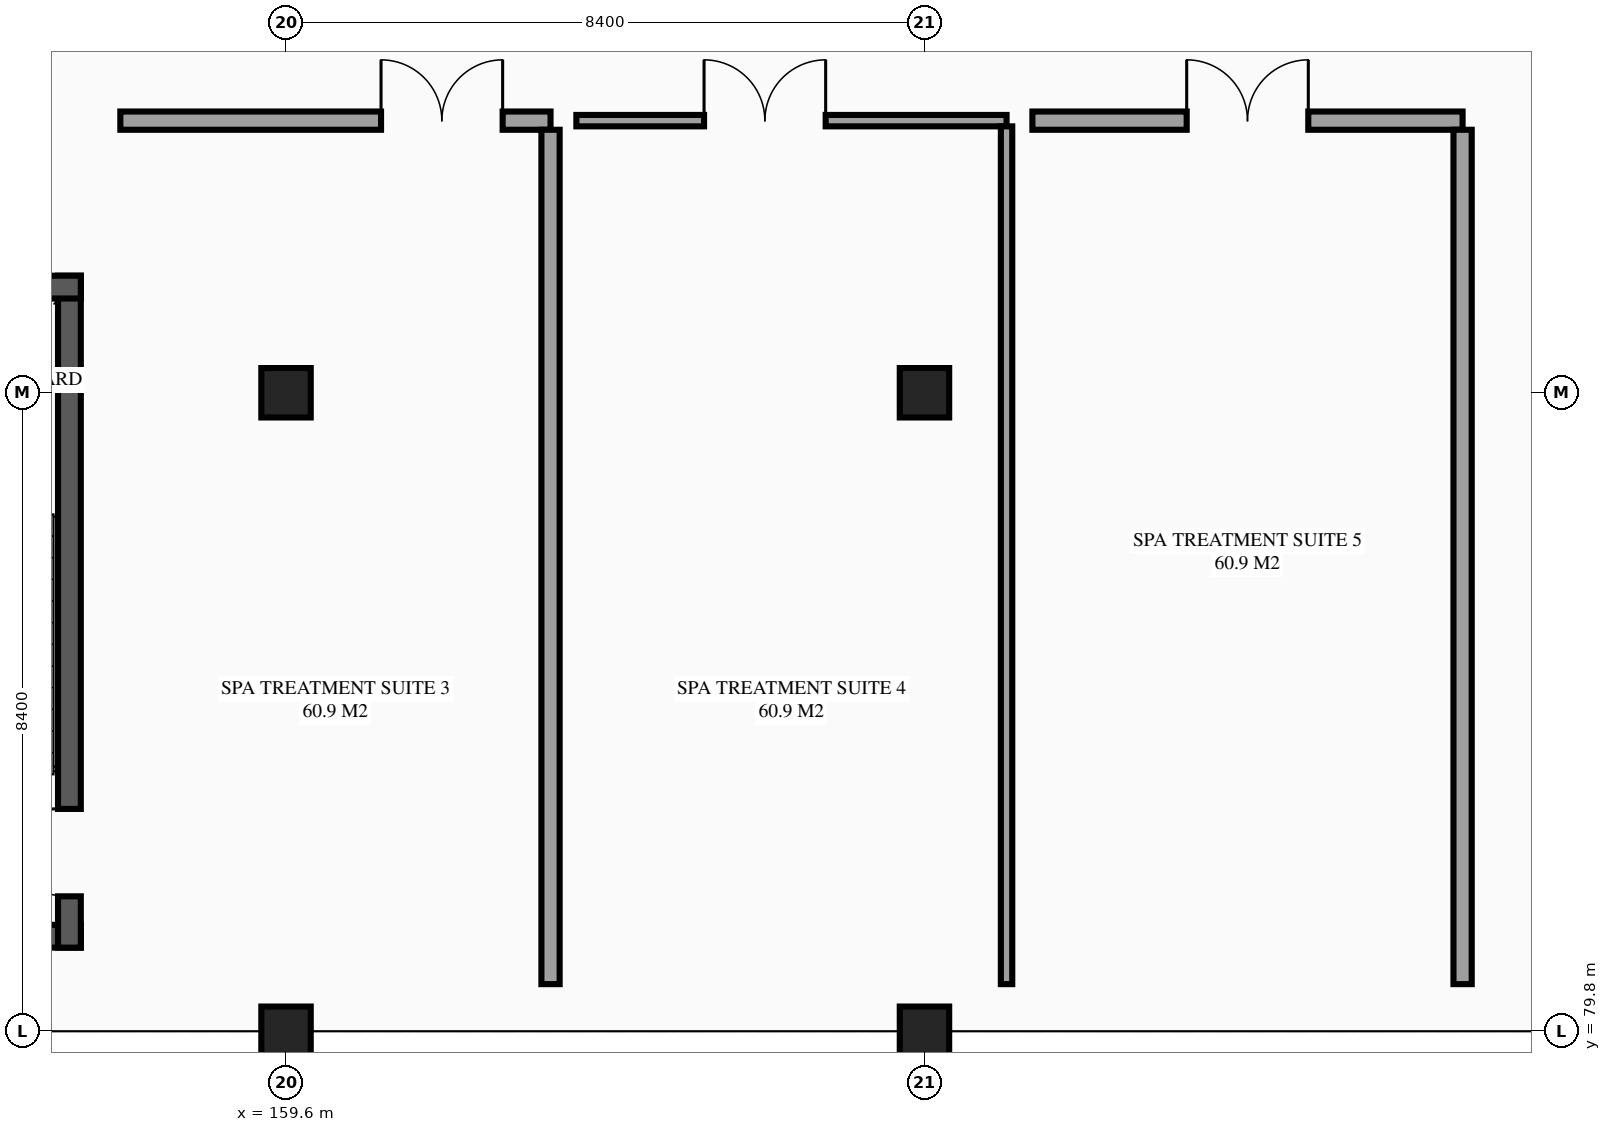
"""IFC4 building model, lengths in metres.
Left out: names, types, materials, properties, quantities, classifications, styles, units other than length and angle.
Written with IfcOpenShell. Run it as: python <this file> out.ifc"""

import sys

from ifc_helpers import new_model, si_unit, direction, frame, frame_2d, origin, origin_2d, place, context, subcontext, project, spatial, rectangle, extrude, element, fill, save


model = new_model("IFC4")
c1 = context("Model", 3, precision=1e-05, world=origin(), true_north=direction((0.0, 1.0)))
c2 = subcontext(c1, "Body", "Model", "MODEL_VIEW")
j1 = project(units=[si_unit("LENGTHUNIT", "METRE"), si_unit("PLANEANGLEUNIT", "RADIAN")], contexts=[c1])
p1 = place(None, origin())
s1 = spatial("IfcSite", under=j1, at=p1, CompositionType="ELEMENT")
p2 = place(p1, origin())
s2 = spatial("IfcBuilding", under=s1, at=p2, CompositionType="ELEMENT")
p3 = place(p2, frame((0.0, 0.0, 5.4)))
s3 = spatial("IfcBuildingStorey", under=s2, at=p3, CompositionType="ELEMENT", Elevation=5.4)
for number, where, z_axis, x_axis in (
    (1, (159.6, 79.8, 0.0), (0.0, 0.0, 1.0), (1.0, 0.0, 0.0)),
    (2, (159.6, 88.2, 0.0), (0.0, 0.0, 1.0), (1.0, 0.0, 0.0)),
    (3, (168.0, 79.8, 0.0), (0.0, 0.0, 1.0), (1.0, 0.0, 0.0)),
    (4, (168.0, 88.2, 0.0), (0.0, 0.0, 1.0), (1.0, 0.0, 0.0)),
):
    element("IfcColumn", number, at=place(p3, frame(where, z_axis=z_axis, x_axis=x_axis)), inside=s3, PredefinedType="COLUMN", context=c2, shape_type="SweptSolid", body=[
        extrude(rectangle(XDim=0.65, YDim=0.65, at=origin_2d()), origin(), (0.0, 0.0, 1.0), 4.5),
    ])
p4 = place(p3, frame((151.7, 81.05, 0.0), z_axis=(0.0, 0.0, 1.0), x_axis=(1.0, 0.0, 0.0)))
e5 = element("IfcWall", 5, at=p4, inside=s3, PredefinedType="SHEAR", context=c2, shape_type="SweptSolid", body=[
    extrude(rectangle(XDim=5.2, YDim=0.3, at=frame_2d((2.6, 0.0))), origin(), (0.0, 0.0, 1.0), 4.5),
])
p5 = place(p3, frame((156.75, 80.9, 0.0), z_axis=(0.0, 0.0, 1.0), x_axis=(0.0, 1.0, 0.0)))
e6 = element("IfcWall", 6, at=p5, inside=s3, PredefinedType="SHEAR", context=c2, shape_type="SweptSolid", body=[
    extrude(rectangle(XDim=8.84, YDim=0.3, at=frame_2d((4.42, 0.0))), origin(), (0.0, 0.0, 1.0), 4.5),
])
p6 = place(p5, frame((0.675, 0.0, 0.0)))
e7 = element("IfcOpeningElement", 7, at=p6, cuts=e6, PredefinedType="OPENING", context=c2, shape_type="SweptSolid", body=[
    extrude(rectangle(XDim=1.15, YDim=2.15, at=frame_2d((0.575, 1.075))), frame((0.0, 0.16, 0.0), z_axis=(0.0, -1.0, 0.0), x_axis=(1.0, 0.0, 0.0)), (0.0, 0.0, 1.0), 0.32),
])
p7 = place(p3, frame((156.9, 89.59, 0.0), z_axis=(0.0, 0.0, 1.0), x_axis=(-1.0, 0.0, 0.0)))
e8 = element("IfcWall", 8, at=p7, inside=s3, PredefinedType="SHEAR", context=c2, shape_type="SweptSolid", body=[
    extrude(rectangle(XDim=5.2, YDim=0.3, at=frame_2d((2.6, 0.0))), origin(), (0.0, 0.0, 1.0), 4.5),
])
p8 = place(p3, frame((157.42, 91.78, 0.0), z_axis=(0.0, 0.0, 1.0), x_axis=(1.0, 0.0, 0.0)))
e9 = element("IfcWall", 9, at=p8, inside=s3, PredefinedType="PARTITIONING", context=c2, shape_type="SweptSolid", body=[
    extrude(rectangle(XDim=5.66, YDim=0.24, at=frame_2d((2.83, 0.0))), origin(), (0.0, 0.0, 1.0), 4.235),
])
p9 = place(p8, frame((3.43, 0.0, 0.0)))
e10 = element("IfcOpeningElement", 10, at=p9, cuts=e9, PredefinedType="OPENING", context=c2, shape_type="SweptSolid", body=[
    extrude(rectangle(XDim=1.6, YDim=2.25, at=frame_2d((0.8, 1.125))), frame((0.0, 0.13, 0.0), z_axis=(0.0, -1.0, 0.0), x_axis=(1.0, 0.0, 0.0)), (0.0, 0.0, 1.0), 0.26),
])
p10 = place(p3, frame((163.08, 80.42, 0.0), z_axis=(0.0, 0.0, 1.0), x_axis=(0.0, 1.0, 0.0)))
e11 = element("IfcWall", 11, at=p10, inside=s3, PredefinedType="PARTITIONING", context=c2, shape_type="SweptSolid", body=[
    extrude(rectangle(XDim=11.24, YDim=0.24, at=frame_2d((5.62, 0.0))), origin(), (0.0, 0.0, 1.0), 4.235),
])
p11 = place(p3, frame((163.42, 91.78, 0.0), z_axis=(0.0, 0.0, 1.0), x_axis=(1.0, 0.0, 0.0)))
e12 = element("IfcWall", 12, at=p11, inside=s3, PredefinedType="PARTITIONING", context=c2, shape_type="SweptSolid", body=[
    extrude(rectangle(XDim=5.66, YDim=0.15, at=frame_2d((2.83, 0.0))), origin(), (0.0, 0.0, 1.0), 4.235),
])
p12 = place(p11, frame((1.68, 0.0, 0.0)))
e13 = element("IfcOpeningElement", 13, at=p12, cuts=e12, PredefinedType="OPENING", context=c2, shape_type="SweptSolid", body=[
    extrude(rectangle(XDim=1.6, YDim=2.25, at=frame_2d((0.8, 1.125))), frame((0.0, 0.085, 0.0), z_axis=(0.0, -1.0, 0.0), x_axis=(1.0, 0.0, 0.0)), (0.0, 0.0, 1.0), 0.17),
])
p13 = place(p3, frame((169.08, 80.42, 0.0), z_axis=(0.0, 0.0, 1.0), x_axis=(0.0, 1.0, 0.0)))
e14 = element("IfcWall", 14, at=p13, inside=s3, PredefinedType="PARTITIONING", context=c2, shape_type="SweptSolid", body=[
    extrude(rectangle(XDim=11.285, YDim=0.15, at=frame_2d((5.643, 0.0))), origin(), (0.0, 0.0, 1.0), 4.235),
])
p14 = place(p3, frame((169.42, 91.78, 0.0), z_axis=(0.0, 0.0, 1.0), x_axis=(1.0, 0.0, 0.0)))
e15 = element("IfcWall", 15, at=p14, inside=s3, PredefinedType="PARTITIONING", context=c2, shape_type="SweptSolid", body=[
    extrude(rectangle(XDim=5.66, YDim=0.24, at=frame_2d((2.83, 0.0))), origin(), (0.0, 0.0, 1.0), 4.235),
])
p15 = place(p14, frame((2.03, 0.0, 0.0)))
e16 = element("IfcOpeningElement", 16, at=p15, cuts=e15, PredefinedType="OPENING", context=c2, shape_type="SweptSolid", body=[
    extrude(rectangle(XDim=1.6, YDim=2.25, at=frame_2d((0.8, 1.125))), frame((0.0, 0.13, 0.0), z_axis=(0.0, -1.0, 0.0), x_axis=(1.0, 0.0, 0.0)), (0.0, 0.0, 1.0), 0.26),
])
p16 = place(p3, frame((175.08, 80.42, 0.0), z_axis=(0.0, 0.0, 1.0), x_axis=(0.0, 1.0, 0.0)))
e17 = element("IfcWall", 17, at=p16, inside=s3, PredefinedType="PARTITIONING", context=c2, shape_type="SweptSolid", body=[
    extrude(rectangle(XDim=11.24, YDim=0.24, at=frame_2d((5.62, 0.0))), origin(), (0.0, 0.0, 1.0), 4.235),
])
p17 = place(p6, origin())
e18 = element("IfcDoor", 18, at=p17, inside=s3, OperationType="SINGLE_SWING_RIGHT", PredefinedType="DOOR", context=c2, shape_type="SweptSolid", body=[
    extrude(rectangle(XDim=1.15, YDim=2.15, at=frame_2d((0.575, 1.075))), frame((0.0, 0.025, 0.0), z_axis=(0.0, -1.0, 0.0), x_axis=(1.0, 0.0, 0.0)), (0.0, 0.0, 1.0), 0.05),
])
fill(e7, e18)
p18 = place(p9, origin())
e19 = element("IfcDoor", 19, at=p18, inside=s3, OperationType="DOUBLE_DOOR_SINGLE_SWING", PredefinedType="DOOR", context=c2, shape_type="SweptSolid", body=[
    extrude(rectangle(XDim=1.6, YDim=2.25, at=frame_2d((0.8, 1.125))), frame((0.0, 0.025, 0.0), z_axis=(0.0, -1.0, 0.0), x_axis=(1.0, 0.0, 0.0)), (0.0, 0.0, 1.0), 0.05),
])
fill(e10, e19)
p19 = place(p12, origin())
e20 = element("IfcDoor", 20, at=p19, inside=s3, OperationType="DOUBLE_DOOR_SINGLE_SWING", PredefinedType="DOOR", context=c2, shape_type="SweptSolid", body=[
    extrude(rectangle(XDim=1.6, YDim=2.25, at=frame_2d((0.8, 1.125))), frame((0.0, 0.025, 0.0), z_axis=(0.0, -1.0, 0.0), x_axis=(1.0, 0.0, 0.0)), (0.0, 0.0, 1.0), 0.05),
])
fill(e13, e20)
p20 = place(p15, origin())
e21 = element("IfcDoor", 21, at=p20, inside=s3, OperationType="DOUBLE_DOOR_SINGLE_SWING", PredefinedType="DOOR", context=c2, shape_type="SweptSolid", body=[
    extrude(rectangle(XDim=1.6, YDim=2.25, at=frame_2d((0.8, 1.125))), frame((0.0, 0.025, 0.0), z_axis=(0.0, -1.0, 0.0), x_axis=(1.0, 0.0, 0.0)), (0.0, 0.0, 1.0), 0.05),
])
fill(e16, e21)
save(model, sys.argv[1])
